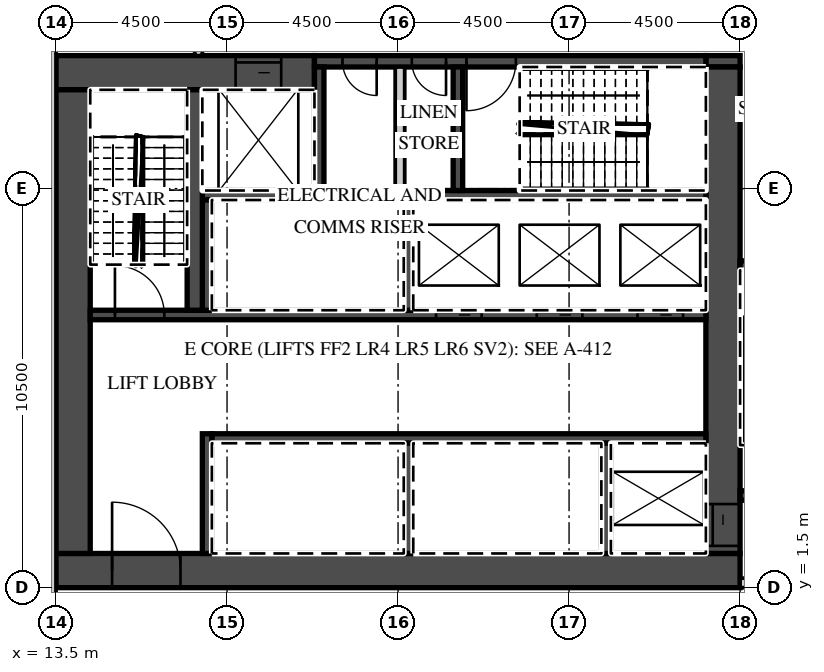
"""IFC4 building model, lengths in metres.
Left out: names, types, materials, properties, quantities, classifications, styles, units other than length and angle.
Written with IfcOpenShell. Run it as: python <this file> out.ifc"""

import sys

from ifc_helpers import new_model, si_unit, direction, frame, frame_2d, origin, place, context, subcontext, project, spatial, rectangle, extrude, element, fill, save


model = new_model("IFC4")
c1 = context("Model", 3, precision=1e-05, world=origin(), true_north=direction((0.0, 1.0)))
c2 = subcontext(c1, "Body", "Model", "MODEL_VIEW")
j1 = project(units=[si_unit("LENGTHUNIT", "METRE"), si_unit("PLANEANGLEUNIT", "RADIAN")], contexts=[c1])
p1 = place(None, origin())
s1 = spatial("IfcSite", under=j1, at=p1, CompositionType="ELEMENT")
p2 = place(p1, origin())
s2 = spatial("IfcBuilding", under=s1, at=p2, CompositionType="ELEMENT")
p3 = place(p2, frame((0.0, 0.0, 38.0)))
s3 = spatial("IfcBuildingStorey", under=s2, at=p3, CompositionType="ELEMENT", Elevation=38.0)
p4 = place(p3, frame((13.5, 1.95, 0.0), z_axis=(0.0, 0.0, 1.0), x_axis=(1.0, 0.0, 0.0)))
e1 = element("IfcWall", 1, at=p4, inside=s3, PredefinedType="SHEAR", context=c2, shape_type="SweptSolid", body=[
    extrude(rectangle(XDim=18.0, YDim=0.9, at=frame_2d((9.0, 0.0))), origin(), (0.0, 0.0, 1.0), 8.7),
])
p5 = place(p4, frame((1.475, 0.0, 0.0)))
e2 = element("IfcOpeningElement", 2, at=p5, cuts=e1, PredefinedType="OPENING", context=c2, shape_type="SweptSolid", body=[
    extrude(rectangle(XDim=1.8, YDim=2.1, at=frame_2d((0.9, 1.05))), frame((0.0, 0.46, 0.0), z_axis=(0.0, -1.0, 0.0), x_axis=(1.0, 0.0, 0.0)), (0.0, 0.0, 1.0), 0.92),
])
p6 = place(p3, frame((13.5, 15.05, 0.0), z_axis=(0.0, 0.0, 1.0), x_axis=(1.0, 0.0, 0.0)))
e3 = element("IfcWall", 3, at=p6, inside=s3, PredefinedType="SHEAR", context=c2, shape_type="SweptSolid", body=[
    extrude(rectangle(XDim=6.8, YDim=0.9, at=frame_2d((3.4, 0.0))), origin(), (0.0, 0.0, 1.0), 8.7),
])
p7 = place(p6, frame((4.725, 0.0, 0.0)))
e4 = element("IfcOpeningElement", 4, at=p7, cuts=e3, PredefinedType="OPENING", context=c2, shape_type="SweptSolid", body=[
    extrude(rectangle(XDim=1.2, YDim=2.1, at=frame_2d((0.6, 1.05))), frame((0.0, 0.46, 0.0), z_axis=(0.0, -1.0, 0.0), x_axis=(1.0, 0.0, 0.0)), (0.0, 0.0, 1.0), 0.92),
])
p8 = place(p3, frame((30.6, 15.35, 0.0), z_axis=(0.0, 0.0, 1.0), x_axis=(1.0, 0.0, 0.0)))
e5 = element("IfcWall", 5, at=p8, inside=s3, PredefinedType="SHEAR", context=c2, shape_type="SweptSolid", body=[
    extrude(rectangle(XDim=0.9, YDim=0.3, at=frame_2d((0.45, 0.0))), origin(), (0.0, 0.0, 1.0), 8.7),
])
p9 = place(p3, frame((20.3, 15.35, 0.0), z_axis=(0.0, 0.0, 1.0), x_axis=(1.0, 0.0, 0.0)))
e6 = element("IfcWall", 6, at=p9, inside=s3, PredefinedType="SHEAR", context=c2, shape_type="SweptSolid", body=[
    extrude(rectangle(XDim=10.3, YDim=0.3, at=frame_2d((5.15, 0.0))), origin(), (0.0, 0.0, 1.0), 8.7),
])
p10 = place(p9, frame((4.0, 0.0, 0.0)))
e7 = element("IfcOpeningElement", 7, at=p10, cuts=e6, PredefinedType="OPENING", context=c2, shape_type="SweptSolid", body=[
    extrude(rectangle(XDim=1.3, YDim=2.1, at=frame_2d((0.65, 1.05))), frame((0.0, 0.16, 0.0), z_axis=(0.0, -1.0, 0.0), x_axis=(1.0, 0.0, 0.0)), (0.0, 0.0, 1.0), 0.32),
])
p11 = place(p9, frame((2.562, 0.0, 0.0)))
e8 = element("IfcOpeningElement", 8, at=p11, cuts=e6, PredefinedType="OPENING", context=c2, shape_type="SweptSolid", body=[
    extrude(rectangle(XDim=0.9, YDim=2.1, at=frame_2d((0.45, 1.05))), frame((0.0, 0.16, 0.0), z_axis=(0.0, -1.0, 0.0), x_axis=(1.0, 0.0, 0.0)), (0.0, 0.0, 1.0), 0.32),
])
p12 = place(p9, frame((0.738, 0.0, 0.0)))
e9 = element("IfcOpeningElement", 9, at=p12, cuts=e6, PredefinedType="OPENING", context=c2, shape_type="SweptSolid", body=[
    extrude(rectangle(XDim=0.9, YDim=2.1, at=frame_2d((0.45, 1.05))), frame((0.0, 0.16, 0.0), z_axis=(0.0, -1.0, 0.0), x_axis=(1.0, 0.0, 0.0)), (0.0, 0.0, 1.0), 0.32),
])
p13 = place(p3, frame((31.05, 2.4, 0.0), z_axis=(0.0, 0.0, 1.0), x_axis=(0.0, 1.0, 0.0)))
e10 = element("IfcWall", 10, at=p13, inside=s3, PredefinedType="SHEAR", context=c2, shape_type="SweptSolid", body=[
    extrude(rectangle(XDim=12.8, YDim=0.9, at=frame_2d((6.4, 0.0))), origin(), (0.0, 0.0, 1.0), 8.7),
])
p14 = place(p13, frame((0.2, 0.0, 0.0)))
e11 = element("IfcOpeningElement", 11, at=p14, cuts=e10, PredefinedType="OPENING", context=c2, shape_type="SweptSolid", body=[
    extrude(rectangle(XDim=1.1, YDim=2.1, at=frame_2d((0.55, 1.05))), frame((0.0, 0.46, 0.0), z_axis=(0.0, -1.0, 0.0), x_axis=(1.0, 0.0, 0.0)), (0.0, 0.0, 1.0), 0.92),
])
p15 = place(p3, frame((13.95, 2.4, 0.0), z_axis=(0.0, 0.0, 1.0), x_axis=(0.0, 1.0, 0.0)))
e12 = element("IfcWall", 12, at=p15, inside=s3, PredefinedType="SHEAR", context=c2, shape_type="SweptSolid", body=[
    extrude(rectangle(XDim=12.2, YDim=0.9, at=frame_2d((6.1, 0.0))), origin(), (0.0, 0.0, 1.0), 8.7),
])
p16 = place(p3, frame((17.6, 5.425, 0.0), z_axis=(0.0, 0.0, 1.0), x_axis=(1.0, 0.0, 0.0)))
e13 = element("IfcWall", 13, at=p16, inside=s3, PredefinedType="SHEAR", context=c2, shape_type="SweptSolid", body=[
    extrude(rectangle(XDim=13.0, YDim=0.25, at=frame_2d((6.5, 0.0))), origin(), (0.0, 0.0, 1.0), 8.7),
])
p17 = place(p3, frame((17.475, 2.4, 0.0), z_axis=(0.0, 0.0, 1.0), x_axis=(0.0, 1.0, 0.0)))
e14 = element("IfcWall", 14, at=p17, inside=s3, PredefinedType="SHEAR", context=c2, shape_type="SweptSolid", body=[
    extrude(rectangle(XDim=3.15, YDim=0.25, at=frame_2d((1.575, 0.0))), origin(), (0.0, 0.0, 1.0), 8.7),
])
for number, where, z_axis, x_axis in (
    (15, (27.975, 2.4, 0.0), (0.0, 0.0, 1.0), (0.0, 1.0, 0.0)),
    (16, (22.775, 2.4, 0.0), (0.0, 0.0, 1.0), (0.0, 1.0, 0.0)),
):
    element("IfcWall", number, at=place(p3, frame(where, z_axis=z_axis, x_axis=x_axis)), inside=s3, PredefinedType="SHEAR", context=c2, shape_type="SweptSolid", body=[
        extrude(rectangle(XDim=2.9, YDim=0.25, at=frame_2d((1.45, 0.0))), origin(), (0.0, 0.0, 1.0), 8.7),
    ])
p18 = place(p3, frame((14.4, 8.675, 0.0), z_axis=(0.0, 0.0, 1.0), x_axis=(1.0, 0.0, 0.0)))
e17 = element("IfcWall", 17, at=p18, inside=s3, PredefinedType="SHEAR", context=c2, shape_type="SweptSolid", body=[
    extrude(rectangle(XDim=16.2, YDim=0.25, at=frame_2d((8.1, 0.0))), origin(), (0.0, 0.0, 1.0), 8.7),
])
p19 = place(p18, frame((14.4, 0.0, 0.0)))
e18 = element("IfcOpeningElement", 18, at=p19, cuts=e17, PredefinedType="OPENING", context=c2, shape_type="SweptSolid", body=[
    extrude(rectangle(XDim=1.2, YDim=2.1, at=frame_2d((0.6, 1.05))), frame((0.0, 0.135, 0.0), z_axis=(0.0, -1.0, 0.0), x_axis=(1.0, 0.0, 0.0)), (0.0, 0.0, 1.0), 0.27),
])
p20 = place(p18, frame((11.75, 0.0, 0.0)))
e19 = element("IfcOpeningElement", 19, at=p20, cuts=e17, PredefinedType="OPENING", context=c2, shape_type="SweptSolid", body=[
    extrude(rectangle(XDim=1.2, YDim=2.1, at=frame_2d((0.6, 1.05))), frame((0.0, 0.135, 0.0), z_axis=(0.0, -1.0, 0.0), x_axis=(1.0, 0.0, 0.0)), (0.0, 0.0, 1.0), 0.27),
])
p21 = place(p18, frame((9.1, 0.0, 0.0)))
e20 = element("IfcOpeningElement", 20, at=p21, cuts=e17, PredefinedType="OPENING", context=c2, shape_type="SweptSolid", body=[
    extrude(rectangle(XDim=1.2, YDim=2.1, at=frame_2d((0.6, 1.05))), frame((0.0, 0.135, 0.0), z_axis=(0.0, -1.0, 0.0), x_axis=(1.0, 0.0, 0.0)), (0.0, 0.0, 1.0), 0.27),
])
p22 = place(p18, frame((0.65, 0.0, 0.0)))
e21 = element("IfcOpeningElement", 21, at=p22, cuts=e17, PredefinedType="OPENING", context=c2, shape_type="SweptSolid", body=[
    extrude(rectangle(XDim=1.3, YDim=2.1, at=frame_2d((0.65, 1.05))), frame((0.0, 0.135, 0.0), z_axis=(0.0, -1.0, 0.0), x_axis=(1.0, 0.0, 0.0)), (0.0, 0.0, 1.0), 0.27),
])
p23 = place(p3, frame((17.35, 11.825, 0.0), z_axis=(0.0, 0.0, 1.0), x_axis=(1.0, 0.0, 0.0)))
e22 = element("IfcWall", 22, at=p23, inside=s3, PredefinedType="SHEAR", context=c2, shape_type="SweptSolid", body=[
    extrude(rectangle(XDim=13.25, YDim=0.25, at=frame_2d((6.625, 0.0))), origin(), (0.0, 0.0, 1.0), 8.7),
])
for number, where, z_axis, x_axis in (
    (23, (17.475, 8.8, 0.0), (0.0, 0.0, 1.0), (0.0, 1.0, 0.0)),
    (24, (22.775, 8.8, 0.0), (0.0, 0.0, 1.0), (0.0, 1.0, 0.0)),
):
    element("IfcWall", number, at=place(p3, frame(where, z_axis=z_axis, x_axis=x_axis)), inside=s3, PredefinedType="SHEAR", context=c2, shape_type="SweptSolid", body=[
        extrude(rectangle(XDim=2.9, YDim=0.25, at=frame_2d((1.45, 0.0))), origin(), (0.0, 0.0, 1.0), 8.7),
    ])
p24 = place(p3, frame((17.15, 8.8, 0.0), z_axis=(0.0, 0.0, 1.0), x_axis=(0.0, 1.0, 0.0)))
e25 = element("IfcWall", 25, at=p24, inside=s3, PredefinedType="SHEAR", context=c2, shape_type="SweptSolid", body=[
    extrude(rectangle(XDim=5.8, YDim=0.4, at=frame_2d((2.9, 0.0))), origin(), (0.0, 0.0, 1.0), 8.7),
])
for number, where, z_axis, x_axis in (
    (26, (20.425, 11.95, 0.0), (0.0, 0.0, 1.0), (0.0, 1.0, 0.0)),
    (27, (24.075, 11.95, 0.0), (0.0, 0.0, 1.0), (0.0, 1.0, 0.0)),
):
    element("IfcWall", number, at=place(p3, frame(where, z_axis=z_axis, x_axis=x_axis)), inside=s3, PredefinedType="SHEAR", context=c2, shape_type="SweptSolid", body=[
        extrude(rectangle(XDim=3.25, YDim=0.25, at=frame_2d((1.625, 0.0))), origin(), (0.0, 0.0, 1.0), 8.7),
    ])
p25 = place(p3, frame((22.55, 11.95, 0.0), z_axis=(0.0, 0.0, 1.0), x_axis=(0.0, 1.0, 0.0)))
e28 = element("IfcWall", 28, at=p25, inside=s3, PredefinedType="PARTITIONING", context=c2, shape_type="SweptSolid", body=[
    extrude(rectangle(XDim=3.25, YDim=0.25, at=frame_2d((1.625, 0.0))), origin(), (0.0, 0.0, 1.0), 8.7),
])
p26 = place(p3, frame((31.5, 1.625, 0.0), z_axis=(0.0, 0.0, 1.0), x_axis=(1.0, 0.0, 0.0)))
e29 = element("IfcWall", 29, at=p26, inside=s3, PredefinedType="PARTITIONING", context=c2, shape_type="SweptSolid", body=[
    extrude(rectangle(XDim=13.35, YDim=0.25, at=frame_2d((6.675, 0.0))), origin(), (0.0, 0.0, 1.0), 8.7),
])
p27 = place(p26, frame((0.625, 0.0, 0.0)))
e30 = element("IfcOpeningElement", 30, at=p27, cuts=e29, PredefinedType="OPENING", context=c2, shape_type="SweptSolid", body=[
    extrude(rectangle(XDim=1.3, YDim=2.1, at=frame_2d((0.65, 1.05))), frame((0.0, 0.135, 0.0), z_axis=(0.0, -1.0, 0.0), x_axis=(1.0, 0.0, 0.0)), (0.0, 0.0, 1.0), 0.27),
])
p28 = place(p26, frame((3.25, 0.0, 0.0)))
e31 = element("IfcOpeningElement", 31, at=p28, cuts=e29, PredefinedType="OPENING", context=c2, shape_type="SweptSolid", body=[
    extrude(rectangle(XDim=1.1, YDim=2.1, at=frame_2d((0.55, 1.05))), frame((0.0, 0.135, 0.0), z_axis=(0.0, -1.0, 0.0), x_axis=(1.0, 0.0, 0.0)), (0.0, 0.0, 1.0), 0.27),
])
p29 = place(p3, frame((31.5, 3.925, 0.0), z_axis=(0.0, 0.0, 1.0), x_axis=(1.0, 0.0, 0.0)))
e32 = element("IfcWall", 32, at=p29, inside=s3, PredefinedType="SHEAR", context=c2, shape_type="SweptSolid", body=[
    extrude(rectangle(XDim=2.55, YDim=0.25, at=frame_2d((1.275, 0.0))), origin(), (0.0, 0.0, 1.0), 8.7),
])
p30 = place(p29, frame((0.625, 0.0, 0.0)))
e33 = element("IfcOpeningElement", 33, at=p30, cuts=e32, PredefinedType="OPENING", context=c2, shape_type="SweptSolid", body=[
    extrude(rectangle(XDim=1.3, YDim=2.1, at=frame_2d((0.65, 1.05))), frame((0.0, 0.135, 0.0), z_axis=(0.0, -1.0, 0.0), x_axis=(1.0, 0.0, 0.0)), (0.0, 0.0, 1.0), 0.27),
])
p31 = place(p3, frame((31.5, 9.975, 0.0), z_axis=(0.0, 0.0, 1.0), x_axis=(1.0, 0.0, 0.0)))
e34 = element("IfcWall", 34, at=p31, inside=s3, PredefinedType="SHEAR", context=c2, shape_type="SweptSolid", body=[
    extrude(rectangle(XDim=2.55, YDim=0.25, at=frame_2d((1.275, 0.0))), origin(), (0.0, 0.0, 1.0), 8.7),
])
p32 = place(p3, frame((17.25, 15.5, 0.0), z_axis=(0.0, 0.0, 1.0), x_axis=(0.0, 1.0, 0.0)))
e35 = element("IfcWall", 35, at=p32, inside=s3, PredefinedType="PARTITIONING", context=c2, shape_type="SweptSolid", body=[
    extrude(rectangle(XDim=2.2, YDim=0.2, at=frame_2d((1.1, 0.0))), origin(), (0.0, 0.0, 1.0), 8.7),
])
p33 = place(p3, frame((13.4, -17.5, 0.0), z_axis=(0.0, 0.0, 1.0), x_axis=(0.0, 1.0, 0.0)))
e36 = element("IfcWall", 36, at=p33, inside=s3, PredefinedType="PARTITIONING", context=c2, shape_type="SweptSolid", body=[
    extrude(rectangle(XDim=35.0, YDim=0.2, at=frame_2d((17.5, 0.0))), origin(), (0.0, 0.0, 1.0), 8.7),
])
p34 = place(p33, frame((10.6, 0.0, 0.0)))
e37 = element("IfcOpeningElement", 37, at=p34, cuts=e36, PredefinedType="OPENING", context=c2, shape_type="SweptSolid", body=[
    extrude(rectangle(XDim=1.8, YDim=2.1, at=frame_2d((0.9, 1.05))), frame((0.0, 0.11, 0.0), z_axis=(0.0, -1.0, 0.0), x_axis=(1.0, 0.0, 0.0)), (0.0, 0.0, 1.0), 0.22),
])
p35 = place(p33, frame((4.6, 0.0, 0.0)))
e38 = element("IfcOpeningElement", 38, at=p35, cuts=e36, PredefinedType="OPENING", context=c2, shape_type="SweptSolid", body=[
    extrude(rectangle(XDim=1.8, YDim=2.1, at=frame_2d((0.9, 1.05))), frame((0.0, 0.11, 0.0), z_axis=(0.0, -1.0, 0.0), x_axis=(1.0, 0.0, 0.0)), (0.0, 0.0, 1.0), 0.22),
])
p36 = place(p19, origin())
e39 = element("IfcDoor", 39, at=p36, inside=s3, OperationType="SLIDING_TO_LEFT", PredefinedType="DOOR", context=c2, shape_type="SweptSolid", body=[
    extrude(rectangle(XDim=1.2, YDim=2.1, at=frame_2d((0.6, 1.05))), frame((0.0, 0.025, 0.0), z_axis=(0.0, -1.0, 0.0), x_axis=(1.0, 0.0, 0.0)), (0.0, 0.0, 1.0), 0.05),
])
fill(e18, e39)
p37 = place(p20, origin())
e40 = element("IfcDoor", 40, at=p37, inside=s3, OperationType="SLIDING_TO_RIGHT", PredefinedType="DOOR", context=c2, shape_type="SweptSolid", body=[
    extrude(rectangle(XDim=1.2, YDim=2.1, at=frame_2d((0.6, 1.05))), frame((0.0, 0.025, 0.0), z_axis=(0.0, -1.0, 0.0), x_axis=(1.0, 0.0, 0.0)), (0.0, 0.0, 1.0), 0.05),
])
fill(e19, e40)
p38 = place(p21, origin())
e41 = element("IfcDoor", 41, at=p38, inside=s3, OperationType="SLIDING_TO_RIGHT", PredefinedType="DOOR", context=c2, shape_type="SweptSolid", body=[
    extrude(rectangle(XDim=1.2, YDim=2.1, at=frame_2d((0.6, 1.05))), frame((0.0, 0.025, 0.0), z_axis=(0.0, -1.0, 0.0), x_axis=(1.0, 0.0, 0.0)), (0.0, 0.0, 1.0), 0.05),
])
fill(e20, e41)
p39 = place(p7, origin())
e42 = element("IfcDoor", 42, at=p39, inside=s3, OperationType="SLIDING_TO_LEFT", PredefinedType="DOOR", context=c2, shape_type="SweptSolid", body=[
    extrude(rectangle(XDim=1.2, YDim=2.1, at=frame_2d((0.6, 1.05))), frame((0.0, 0.025, 0.0), z_axis=(0.0, -1.0, 0.0), x_axis=(1.0, 0.0, 0.0)), (0.0, 0.0, 1.0), 0.05),
])
fill(e4, e42)
p40 = place(p14, origin())
e43 = element("IfcDoor", 43, at=p40, inside=s3, OperationType="SLIDING_TO_LEFT", PredefinedType="DOOR", context=c2, shape_type="SweptSolid", body=[
    extrude(rectangle(XDim=1.1, YDim=2.1, at=frame_2d((0.55, 1.05))), frame((0.0, 0.025, 0.0), z_axis=(0.0, -1.0, 0.0), x_axis=(1.0, 0.0, 0.0)), (0.0, 0.0, 1.0), 0.05),
])
fill(e11, e43)
p41 = place(p5, origin())
e44 = element("IfcDoor", 44, at=p41, inside=s3, OperationType="DOUBLE_DOOR_DOUBLE_SWING", PredefinedType="DOOR", context=c2, shape_type="SweptSolid", body=[
    extrude(rectangle(XDim=1.8, YDim=2.1, at=frame_2d((0.9, 1.05))), frame((0.0, 0.025, 0.0), z_axis=(0.0, -1.0, 0.0), x_axis=(1.0, 0.0, 0.0)), (0.0, 0.0, 1.0), 0.05),
])
fill(e2, e44)
p42 = place(p22, origin())
e45 = element("IfcDoor", 45, at=p42, inside=s3, OperationType="SINGLE_SWING_LEFT", PredefinedType="DOOR", context=c2, shape_type="SweptSolid", body=[
    extrude(rectangle(XDim=1.3, YDim=2.1, at=frame_2d((0.65, 1.05))), frame((0.0, 0.025, 0.0), z_axis=(0.0, -1.0, 0.0), x_axis=(1.0, 0.0, 0.0)), (0.0, 0.0, 1.0), 0.05),
])
fill(e21, e45)
p43 = place(p10, origin())
e46 = element("IfcDoor", 46, at=p43, inside=s3, OperationType="SINGLE_SWING_LEFT", PredefinedType="DOOR", context=c2, shape_type="SweptSolid", body=[
    extrude(rectangle(XDim=1.3, YDim=2.1, at=frame_2d((0.65, 1.05))), frame((0.0, 0.025, 0.0), z_axis=(0.0, -1.0, 0.0), x_axis=(1.0, 0.0, 0.0)), (0.0, 0.0, 1.0), 0.05),
])
fill(e7, e46)
p44 = place(p11, origin())
e47 = element("IfcDoor", 47, at=p44, inside=s3, OperationType="SINGLE_SWING_RIGHT", PredefinedType="DOOR", context=c2, shape_type="SweptSolid", body=[
    extrude(rectangle(XDim=0.9, YDim=2.1, at=frame_2d((0.45, 1.05))), frame((0.0, 0.025, 0.0), z_axis=(0.0, -1.0, 0.0), x_axis=(1.0, 0.0, 0.0)), (0.0, 0.0, 1.0), 0.05),
])
fill(e8, e47)
p45 = place(p12, origin())
e48 = element("IfcDoor", 48, at=p45, inside=s3, OperationType="SINGLE_SWING_RIGHT", PredefinedType="DOOR", context=c2, shape_type="SweptSolid", body=[
    extrude(rectangle(XDim=0.9, YDim=2.1, at=frame_2d((0.45, 1.05))), frame((0.0, 0.025, 0.0), z_axis=(0.0, -1.0, 0.0), x_axis=(1.0, 0.0, 0.0)), (0.0, 0.0, 1.0), 0.05),
])
fill(e9, e48)
save(model, sys.argv[1])
